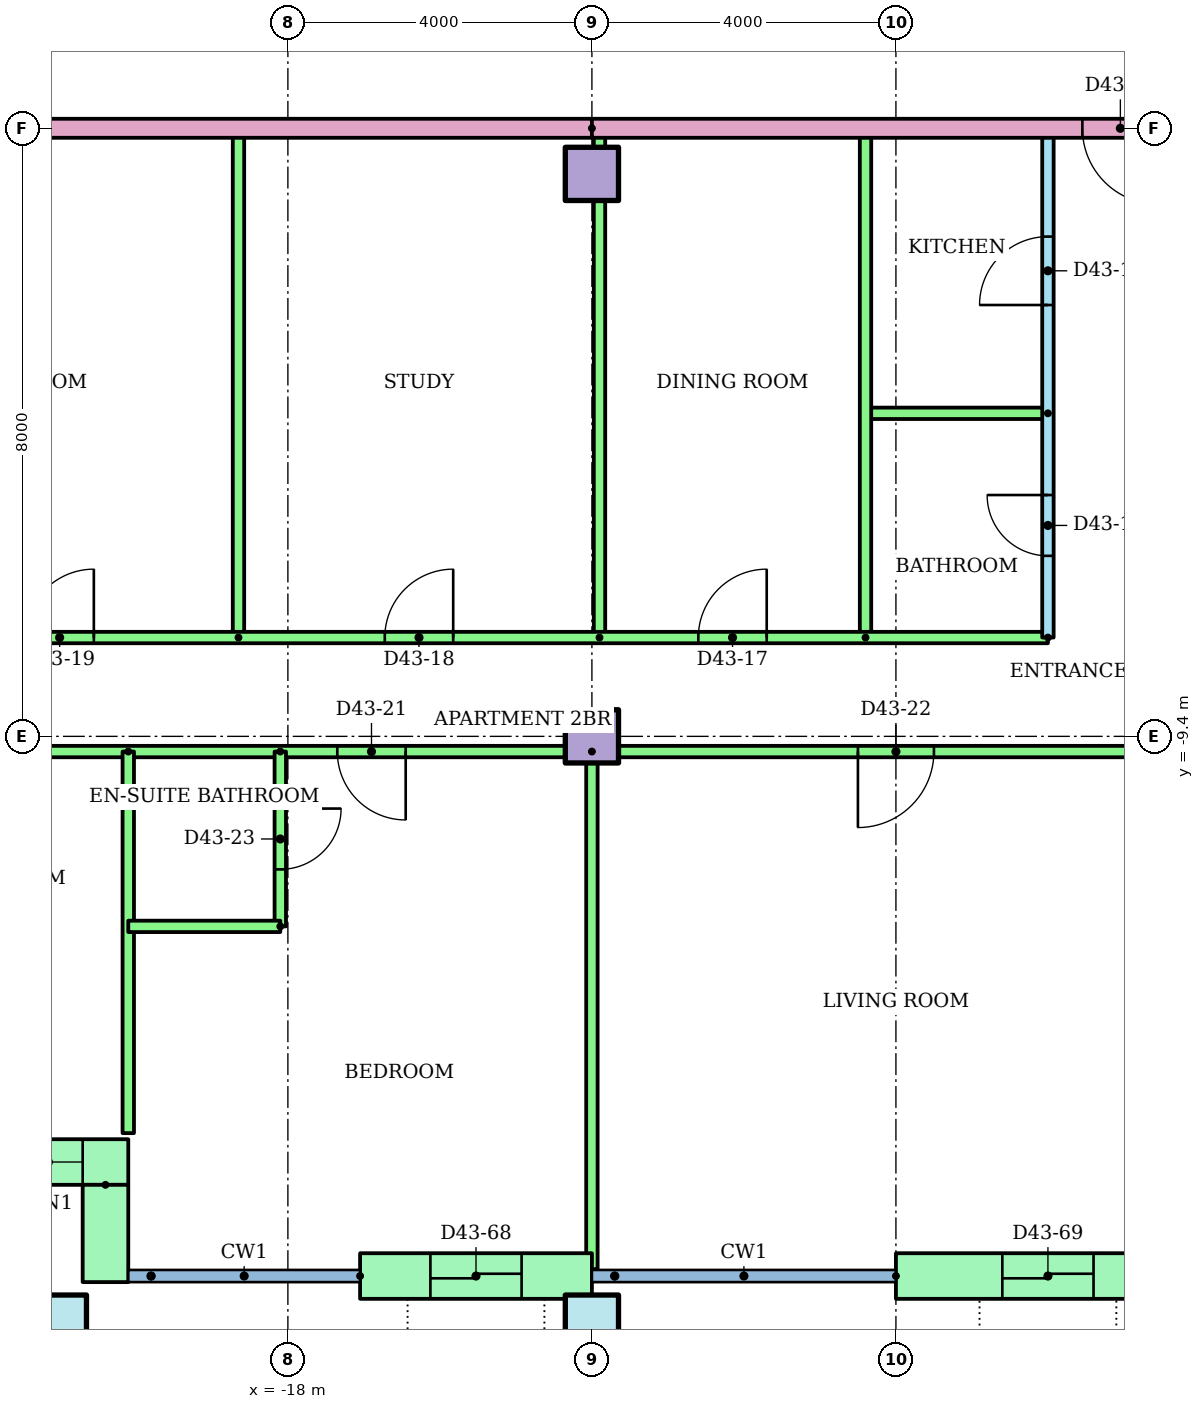
"""IFC4 building model, lengths in metres.
Left out: names, types, materials, properties, quantities, classifications, styles, units other than length and angle.
Written with IfcOpenShell. Run it as: python <this file> out.ifc"""

import sys

from ifc_helpers import new_model, si_unit, direction, frame, frame_2d, origin, origin_2d, place, context, subcontext, project, spatial, rectangle, hollow_rectangle, extrude, element, fill, save


model = new_model("IFC4")
c1 = context("Model", 3, precision=1e-05, world=origin(), true_north=direction((0.0, 1.0)))
c2 = subcontext(c1, "Body", "Model", "MODEL_VIEW")
j1 = project(units=[si_unit("LENGTHUNIT", "METRE"), si_unit("PLANEANGLEUNIT", "RADIAN")], contexts=[c1])
p1 = place(None, origin())
s1 = spatial("IfcSite", under=j1, at=p1, CompositionType="ELEMENT")
p2 = place(p1, origin())
s2 = spatial("IfcBuilding", under=s1, at=p2, CompositionType="ELEMENT")
p3 = place(p2, frame((0.0, 0.0, 168.5)))
s3 = spatial("IfcBuildingStorey", under=s2, at=p3, CompositionType="ELEMENT", Elevation=168.5)
for number, where in (
    (1, (-21.0, -17.1, 0.0)),
    (2, (-14.0, -17.1, 0.0)),
):
    element("IfcColumn", number, at=place(p3, frame(where)), inside=s3, PredefinedType="COLUMN", context=c2, shape_type="SweptSolid", body=[
        extrude(hollow_rectangle(XDim=0.7, YDim=0.7, WallThickness=0.036, at=origin_2d()), origin(), (0.0, 0.0, 1.0), 3.2),
    ])
for number, where in (
    (3, (-14.0, -9.4, 0.0)),
    (4, (-14.0, -2.0, 0.0)),
):
    element("IfcColumn", number, at=place(p3, frame(where)), inside=s3, PredefinedType="COLUMN", context=c2, shape_type="SweptSolid", body=[
        extrude(rectangle(XDim=0.7, YDim=0.7, at=origin_2d()), origin(), (0.0, 0.0, 1.0), 3.2),
    ])
p4 = place(p3, frame((-22.2, -15.0, 0.0)))
e5 = element("IfcWall", 5, at=p4, inside=s3, PredefinedType="STANDARD", context=c2, shape_type="SweptSolid", body=[
    extrude(rectangle(XDim=2.1, YDim=0.6, at=frame_2d((1.05, 0.0))), origin(), (0.0, 0.0, 1.0), 2.92),
])
p5 = place(p4, frame((0.6, 0.0, 0.9)))
e6 = element("IfcOpeningElement", 6, at=p5, cuts=e5, PredefinedType="OPENING", context=c2, shape_type="SweptSolid", body=[
    extrude(rectangle(XDim=0.9, YDim=1.5, at=frame_2d((0.45, 0.75))), frame((0.0, 0.31, 0.0), z_axis=(0.0, -1.0, 0.0), x_axis=(1.0, 0.0, 0.0)), (0.0, 0.0, 1.0), 0.62),
])
p6 = place(p3, frame((-20.4, -15.3, 0.0), z_axis=(0.0, 0.0, 1.0), x_axis=(0.0, -1.0, 0.0)))
e7 = element("IfcWall", 7, at=p6, inside=s3, PredefinedType="STANDARD", context=c2, shape_type="SweptSolid", body=[
    extrude(rectangle(XDim=1.28, YDim=0.6, at=frame_2d((0.64, 0.0))), origin(), (0.0, 0.0, 1.0), 2.92),
])
p7 = place(p3, frame((-17.05, -16.5, 0.0)))
e8 = element("IfcWall", 8, at=p7, inside=s3, PredefinedType="STANDARD", context=c2, shape_type="SweptSolid", body=[
    extrude(rectangle(XDim=3.05, YDim=0.6, at=frame_2d((1.525, 0.0))), origin(), (0.0, 0.0, 1.0), 2.92),
])
p8 = place(p7, frame((0.925, 0.0, 0.0)))
e9 = element("IfcOpeningElement", 9, at=p8, cuts=e8, PredefinedType="OPENING", context=c2, shape_type="SweptSolid", body=[
    extrude(rectangle(XDim=1.2, YDim=2.1, at=frame_2d((0.6, 1.05))), frame((0.0, 0.31, 0.0), z_axis=(0.0, -1.0, 0.0), x_axis=(1.0, 0.0, 0.0)), (0.0, 0.0, 1.0), 0.62),
])
p9 = place(p3, frame((-10.0, -16.5, 0.0)))
e10 = element("IfcWall", 10, at=p9, inside=s3, PredefinedType="STANDARD", context=c2, shape_type="SweptSolid", body=[
    extrude(rectangle(XDim=4.0, YDim=0.6, at=frame_2d((2.0, 0.0))), origin(), (0.0, 0.0, 1.0), 2.92),
])
p10 = place(p9, frame((1.4, 0.0, 0.0)))
e11 = element("IfcOpeningElement", 11, at=p10, cuts=e10, PredefinedType="OPENING", context=c2, shape_type="SweptSolid", body=[
    extrude(rectangle(XDim=1.2, YDim=2.1, at=frame_2d((0.6, 1.05))), frame((0.0, 0.31, 0.0), z_axis=(0.0, -1.0, 0.0), x_axis=(1.0, 0.0, 0.0)), (0.0, 0.0, 1.0), 0.62),
])
p11 = place(p3, frame((-8.0, -8.1, 0.0), z_axis=(0.0, 0.0, 1.0), x_axis=(0.0, 1.0, 0.0)))
e12 = element("IfcWall", 12, at=p11, inside=s3, PredefinedType="PARTITIONING", context=c2, shape_type="SweptSolid", body=[
    extrude(rectangle(XDim=6.7, YDim=0.15, at=frame_2d((3.35, 0.0))), origin(), (0.0, 0.0, 1.0), 2.4),
])
p12 = place(p11, frame((4.375, 0.0, 0.0)))
e13 = element("IfcOpeningElement", 13, at=p12, cuts=e12, PredefinedType="OPENING", context=c2, shape_type="SweptSolid", body=[
    extrude(rectangle(XDim=0.9, YDim=2.1, at=frame_2d((0.45, 1.05))), frame((0.0, 0.085, 0.0), z_axis=(0.0, -1.0, 0.0), x_axis=(1.0, 0.0, 0.0)), (0.0, 0.0, 1.0), 0.17),
])
p13 = place(p11, frame((1.075, 0.0, 0.0)))
e14 = element("IfcOpeningElement", 14, at=p13, cuts=e12, PredefinedType="OPENING", context=c2, shape_type="SweptSolid", body=[
    extrude(rectangle(XDim=0.8, YDim=2.1, at=frame_2d((0.4, 1.05))), frame((0.0, 0.085, 0.0), z_axis=(0.0, -1.0, 0.0), x_axis=(1.0, 0.0, 0.0)), (0.0, 0.0, 1.0), 0.17),
])
p14 = place(p3, frame((-8.0, -5.15, 0.0), z_axis=(0.0, 0.0, 1.0), x_axis=(-1.0, 0.0, 0.0)))
e15 = element("IfcWall", 15, at=p14, inside=s3, PredefinedType="PARTITIONING", context=c2, shape_type="SweptSolid", body=[
    extrude(rectangle(XDim=2.4, YDim=0.15, at=frame_2d((1.2, 0.0))), origin(), (0.0, 0.0, 1.0), 2.4),
])
for number, where, z_axis, x_axis in (
    (16, (-10.4, -8.1, 0.0), (0.0, 0.0, 1.0), (0.0, 1.0, 0.0)),
    (17, (-13.9, -8.1, 0.0), (0.0, 0.0, 1.0), (0.0, 1.0, 0.0)),
    (18, (-18.65, -8.1, 0.0), (0.0, 0.0, 1.0), (0.0, 1.0, 0.0)),
):
    element("IfcWall", number, at=place(p3, frame(where, z_axis=z_axis, x_axis=x_axis)), inside=s3, PredefinedType="PARTITIONING", context=c2, shape_type="SweptSolid", body=[
        extrude(rectangle(XDim=6.7, YDim=0.15, at=frame_2d((3.35, 0.0))), origin(), (0.0, 0.0, 1.0), 2.4),
    ])
p15 = place(p3, frame((-24.81, -8.1, 0.0)))
e19 = element("IfcWall", 19, at=p15, inside=s3, PredefinedType="PARTITIONING", context=c2, shape_type="SweptSolid", body=[
    extrude(rectangle(XDim=16.81, YDim=0.15, at=frame_2d((8.405, 0.0))), origin(), (0.0, 0.0, 1.0), 2.4),
])
p16 = place(p15, frame((12.21, 0.0, 0.0)))
e20 = element("IfcOpeningElement", 20, at=p16, cuts=e19, PredefinedType="OPENING", context=c2, shape_type="SweptSolid", body=[
    extrude(rectangle(XDim=0.9, YDim=2.1, at=frame_2d((0.45, 1.05))), frame((0.0, 0.085, 0.0), z_axis=(0.0, -1.0, 0.0), x_axis=(1.0, 0.0, 0.0)), (0.0, 0.0, 1.0), 0.17),
])
p17 = place(p15, frame((8.085, 0.0, 0.0)))
e21 = element("IfcOpeningElement", 21, at=p17, cuts=e19, PredefinedType="OPENING", context=c2, shape_type="SweptSolid", body=[
    extrude(rectangle(XDim=0.9, YDim=2.1, at=frame_2d((0.45, 1.05))), frame((0.0, 0.085, 0.0), z_axis=(0.0, -1.0, 0.0), x_axis=(1.0, 0.0, 0.0)), (0.0, 0.0, 1.0), 0.17),
])
p18 = place(p15, frame((3.357, 0.0, 0.0)))
e22 = element("IfcOpeningElement", 22, at=p18, cuts=e19, PredefinedType="OPENING", context=c2, shape_type="SweptSolid", body=[
    extrude(rectangle(XDim=0.9, YDim=2.1, at=frame_2d((0.45, 1.05))), frame((0.0, 0.085, 0.0), z_axis=(0.0, -1.0, 0.0), x_axis=(1.0, 0.0, 0.0)), (0.0, 0.0, 1.0), 0.17),
])
p19 = place(p3, frame((-6.0, -9.6, 0.0), z_axis=(0.0, 0.0, 1.0), x_axis=(-1.0, 0.0, 0.0)))
e23 = element("IfcWall", 23, at=p19, inside=s3, PredefinedType="PARTITIONING", context=c2, shape_type="SweptSolid", body=[
    extrude(rectangle(XDim=18.82, YDim=0.15, at=frame_2d((9.41, 0.0))), origin(), (0.0, 0.0, 1.0), 2.4),
])
p20 = place(p19, frame((16.547, 0.0, 0.0)))
e24 = element("IfcOpeningElement", 24, at=p20, cuts=e23, PredefinedType="OPENING", context=c2, shape_type="SweptSolid", body=[
    extrude(rectangle(XDim=0.9, YDim=2.1, at=frame_2d((0.45, 1.05))), frame((0.0, 0.085, 0.0), z_axis=(0.0, -1.0, 0.0), x_axis=(1.0, 0.0, 0.0)), (0.0, 0.0, 1.0), 0.17),
])
p21 = place(p19, frame((10.45, 0.0, 0.0)))
e25 = element("IfcOpeningElement", 25, at=p21, cuts=e23, PredefinedType="OPENING", context=c2, shape_type="SweptSolid", body=[
    extrude(rectangle(XDim=0.9, YDim=2.1, at=frame_2d((0.45, 1.05))), frame((0.0, 0.085, 0.0), z_axis=(0.0, -1.0, 0.0), x_axis=(1.0, 0.0, 0.0)), (0.0, 0.0, 1.0), 0.17),
])
p22 = place(p19, frame((3.5, 0.0, 0.0)))
e26 = element("IfcOpeningElement", 26, at=p22, cuts=e23, PredefinedType="OPENING", context=c2, shape_type="SweptSolid", body=[
    extrude(rectangle(XDim=1.0, YDim=2.1, at=frame_2d((0.5, 1.05))), frame((0.0, 0.085, 0.0), z_axis=(0.0, -1.0, 0.0), x_axis=(1.0, 0.0, 0.0)), (0.0, 0.0, 1.0), 0.17),
])
p23 = place(p3, frame((-20.1, -9.6, 0.0), z_axis=(0.0, 0.0, 1.0), x_axis=(0.0, -1.0, 0.0)))
e27 = element("IfcWall", 27, at=p23, inside=s3, PredefinedType="PARTITIONING", context=c2, shape_type="SweptSolid", body=[
    extrude(rectangle(XDim=5.02, YDim=0.15, at=frame_2d((2.51, 0.0))), origin(), (0.0, 0.0, 1.0), 2.4),
])
p24 = place(p3, frame((-14.0, -9.6, 0.0), z_axis=(0.0, 0.0, 1.0), x_axis=(0.0, -1.0, 0.0)))
e28 = element("IfcWall", 28, at=p24, inside=s3, PredefinedType="PARTITIONING", context=c2, shape_type="SweptSolid", body=[
    extrude(rectangle(XDim=6.81, YDim=0.15, at=frame_2d((3.405, 0.0))), origin(), (0.0, 0.0, 1.0), 2.4),
])
p25 = place(p3, frame((-18.1, -9.6, 0.0), z_axis=(0.0, 0.0, 1.0), x_axis=(0.0, -1.0, 0.0)))
e29 = element("IfcWall", 29, at=p25, inside=s3, PredefinedType="PARTITIONING", context=c2, shape_type="SweptSolid", body=[
    extrude(rectangle(XDim=2.3, YDim=0.15, at=frame_2d((1.15, 0.0))), origin(), (0.0, 0.0, 1.0), 2.4),
])
p26 = place(p25, frame((0.75, 0.0, 0.0)))
e30 = element("IfcOpeningElement", 30, at=p26, cuts=e29, PredefinedType="OPENING", context=c2, shape_type="SweptSolid", body=[
    extrude(rectangle(XDim=0.8, YDim=2.1, at=frame_2d((0.4, 1.05))), frame((0.0, 0.085, 0.0), z_axis=(0.0, -1.0, 0.0), x_axis=(1.0, 0.0, 0.0)), (0.0, 0.0, 1.0), 0.17),
])
p27 = place(p3, frame((-18.1, -11.9, 0.0), z_axis=(0.0, 0.0, 1.0), x_axis=(-1.0, 0.0, 0.0)))
e31 = element("IfcWall", 31, at=p27, inside=s3, PredefinedType="PARTITIONING", context=c2, shape_type="SweptSolid", body=[
    extrude(rectangle(XDim=2.0, YDim=0.15, at=frame_2d((1.0, 0.0))), origin(), (0.0, 0.0, 1.0), 2.4),
])
p28 = place(p3, frame((-14.0, -1.4, 0.0), z_axis=(0.0, 0.0, 1.0), x_axis=(-1.0, 0.0, 0.0)))
e32 = element("IfcWall", 32, at=p28, inside=s3, PredefinedType="PARTITIONING", context=c2, shape_type="SweptSolid", body=[
    extrude(rectangle(XDim=10.82, YDim=0.25, at=frame_2d((5.41, 0.0))), origin(), (0.0, 0.0, 1.0), 2.4),
])
p29 = place(p3, frame((14.0, -1.4, 0.0), z_axis=(0.0, 0.0, 1.0), x_axis=(-1.0, 0.0, 0.0)))
e33 = element("IfcWall", 33, at=p29, inside=s3, PredefinedType="PARTITIONING", context=c2, shape_type="SweptSolid", body=[
    extrude(rectangle(XDim=28.0, YDim=0.25, at=frame_2d((14.0, 0.0))), origin(), (0.0, 0.0, 1.0), 2.4),
])
p30 = place(p29, frame((20.547, 0.0, 0.0)))
e34 = element("IfcOpeningElement", 34, at=p30, cuts=e33, PredefinedType="OPENING", context=c2, shape_type="SweptSolid", body=[
    extrude(rectangle(XDim=1.0, YDim=2.1, at=frame_2d((0.5, 1.05))), frame((0.0, 0.135, 0.0), z_axis=(0.0, -1.0, 0.0), x_axis=(1.0, 0.0, 0.0)), (0.0, 0.0, 1.0), 0.27),
])
p31 = place(p29, frame((18.453, 0.0, 0.0)))
e35 = element("IfcOpeningElement", 35, at=p31, cuts=e33, PredefinedType="OPENING", context=c2, shape_type="SweptSolid", body=[
    extrude(rectangle(XDim=1.0, YDim=2.1, at=frame_2d((0.5, 1.05))), frame((0.0, 0.135, 0.0), z_axis=(0.0, -1.0, 0.0), x_axis=(1.0, 0.0, 0.0)), (0.0, 0.0, 1.0), 0.27),
])
p32 = place(p29, frame((2.453, 0.0, 0.0)))
e36 = element("IfcOpeningElement", 36, at=p32, cuts=e33, PredefinedType="OPENING", context=c2, shape_type="SweptSolid", body=[
    extrude(rectangle(XDim=1.0, YDim=2.1, at=frame_2d((0.5, 1.05))), frame((0.0, 0.135, 0.0), z_axis=(0.0, -1.0, 0.0), x_axis=(1.0, 0.0, 0.0)), (0.0, 0.0, 1.0), 0.27),
])
p33 = place(p5, origin())
e37 = element("IfcWindow", 37, at=p33, inside=s3, PartitioningType="SINGLE_PANEL", PredefinedType="WINDOW", context=c2, shape_type="SweptSolid", body=[
    extrude(rectangle(XDim=0.9, YDim=1.5, at=frame_2d((0.45, 0.75))), frame((0.0, 0.03, 0.0), z_axis=(0.0, -1.0, 0.0), x_axis=(1.0, 0.0, 0.0)), (0.0, 0.0, 1.0), 0.06),
])
fill(e6, e37)
p34 = place(p12, origin())
e38 = element("IfcDoor", 38, at=p34, inside=s3, OperationType="SINGLE_SWING_LEFT", PredefinedType="DOOR", context=c2, shape_type="SweptSolid", body=[
    extrude(rectangle(XDim=0.9, YDim=2.1, at=frame_2d((0.45, 1.05))), frame((0.0, 0.025, 0.0), z_axis=(0.0, -1.0, 0.0), x_axis=(1.0, 0.0, 0.0)), (0.0, 0.0, 1.0), 0.05),
])
fill(e13, e38)
p35 = place(p13, origin())
e39 = element("IfcDoor", 39, at=p35, inside=s3, OperationType="SINGLE_SWING_RIGHT", PredefinedType="DOOR", context=c2, shape_type="SweptSolid", body=[
    extrude(rectangle(XDim=0.8, YDim=2.1, at=frame_2d((0.4, 1.05))), frame((0.0, 0.025, 0.0), z_axis=(0.0, -1.0, 0.0), x_axis=(1.0, 0.0, 0.0)), (0.0, 0.0, 1.0), 0.05),
])
fill(e14, e39)
p36 = place(p16, origin())
e40 = element("IfcDoor", 40, at=p36, inside=s3, OperationType="SINGLE_SWING_RIGHT", PredefinedType="DOOR", context=c2, shape_type="SweptSolid", body=[
    extrude(rectangle(XDim=0.9, YDim=2.1, at=frame_2d((0.45, 1.05))), frame((0.0, 0.025, 0.0), z_axis=(0.0, -1.0, 0.0), x_axis=(1.0, 0.0, 0.0)), (0.0, 0.0, 1.0), 0.05),
])
fill(e20, e40)
p37 = place(p17, origin())
e41 = element("IfcDoor", 41, at=p37, inside=s3, OperationType="SINGLE_SWING_RIGHT", PredefinedType="DOOR", context=c2, shape_type="SweptSolid", body=[
    extrude(rectangle(XDim=0.9, YDim=2.1, at=frame_2d((0.45, 1.05))), frame((0.0, 0.025, 0.0), z_axis=(0.0, -1.0, 0.0), x_axis=(1.0, 0.0, 0.0)), (0.0, 0.0, 1.0), 0.05),
])
fill(e21, e41)
p38 = place(p18, origin())
e42 = element("IfcDoor", 42, at=p38, inside=s3, OperationType="SINGLE_SWING_RIGHT", PredefinedType="DOOR", context=c2, shape_type="SweptSolid", body=[
    extrude(rectangle(XDim=0.9, YDim=2.1, at=frame_2d((0.45, 1.05))), frame((0.0, 0.025, 0.0), z_axis=(0.0, -1.0, 0.0), x_axis=(1.0, 0.0, 0.0)), (0.0, 0.0, 1.0), 0.05),
])
fill(e22, e42)
p39 = place(p21, origin())
e43 = element("IfcDoor", 43, at=p39, inside=s3, OperationType="SINGLE_SWING_LEFT", PredefinedType="DOOR", context=c2, shape_type="SweptSolid", body=[
    extrude(rectangle(XDim=0.9, YDim=2.1, at=frame_2d((0.45, 1.05))), frame((0.0, 0.025, 0.0), z_axis=(0.0, -1.0, 0.0), x_axis=(1.0, 0.0, 0.0)), (0.0, 0.0, 1.0), 0.05),
])
fill(e25, e43)
p40 = place(p22, origin())
e44 = element("IfcDoor", 44, at=p40, inside=s3, OperationType="SINGLE_SWING_RIGHT", PredefinedType="DOOR", context=c2, shape_type="SweptSolid", body=[
    extrude(rectangle(XDim=1.0, YDim=2.1, at=frame_2d((0.5, 1.05))), frame((0.0, 0.025, 0.0), z_axis=(0.0, -1.0, 0.0), x_axis=(1.0, 0.0, 0.0)), (0.0, 0.0, 1.0), 0.05),
])
fill(e26, e44)
p41 = place(p26, origin())
e45 = element("IfcDoor", 45, at=p41, inside=s3, OperationType="SINGLE_SWING_LEFT", PredefinedType="DOOR", context=c2, shape_type="SweptSolid", body=[
    extrude(rectangle(XDim=0.8, YDim=2.1, at=frame_2d((0.4, 1.05))), frame((0.0, 0.025, 0.0), z_axis=(0.0, -1.0, 0.0), x_axis=(1.0, 0.0, 0.0)), (0.0, 0.0, 1.0), 0.05),
])
fill(e30, e45)
p42 = place(p30, origin())
e46 = element("IfcDoor", 46, at=p42, inside=s3, OperationType="SINGLE_SWING_LEFT", PredefinedType="DOOR", context=c2, shape_type="SweptSolid", body=[
    extrude(rectangle(XDim=1.0, YDim=2.1, at=frame_2d((0.5, 1.05))), frame((0.0, 0.025, 0.0), z_axis=(0.0, -1.0, 0.0), x_axis=(1.0, 0.0, 0.0)), (0.0, 0.0, 1.0), 0.05),
])
fill(e34, e46)
p43 = place(p8, origin())
e47 = element("IfcDoor", 47, at=p43, inside=s3, OperationType="SLIDING_TO_LEFT", PredefinedType="DOOR", context=c2, shape_type="SweptSolid", body=[
    extrude(rectangle(XDim=1.2, YDim=2.1, at=frame_2d((0.6, 1.05))), frame((0.0, 0.025, 0.0), z_axis=(0.0, -1.0, 0.0), x_axis=(1.0, 0.0, 0.0)), (0.0, 0.0, 1.0), 0.05),
])
fill(e9, e47)
p44 = place(p10, origin())
e48 = element("IfcDoor", 48, at=p44, inside=s3, OperationType="SLIDING_TO_LEFT", PredefinedType="DOOR", context=c2, shape_type="SweptSolid", body=[
    extrude(rectangle(XDim=1.2, YDim=2.1, at=frame_2d((0.6, 1.05))), frame((0.0, 0.025, 0.0), z_axis=(0.0, -1.0, 0.0), x_axis=(1.0, 0.0, 0.0)), (0.0, 0.0, 1.0), 0.05),
])
fill(e11, e48)
save(model, sys.argv[1])
